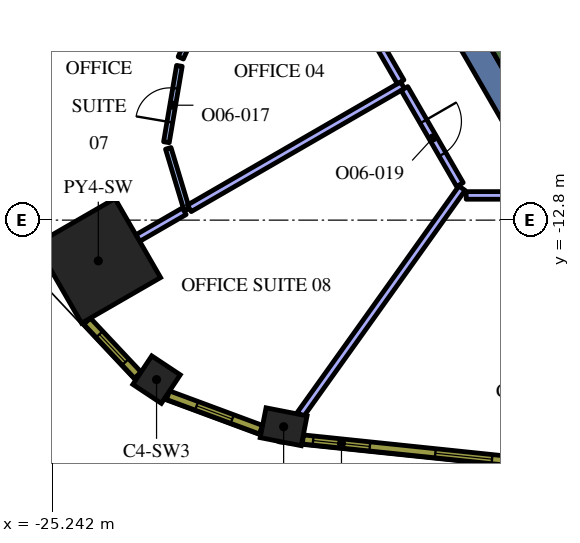
"""IFC4 building model, lengths in metres.
Left out: names, types, materials, properties, quantities, classifications, styles, units other than length and angle.
Written with IfcOpenShell. Run it as: python <this file> out.ifc"""

import sys

from ifc_helpers import new_model, si_unit, direction, frame, frame_2d, origin, origin_2d, place, context, subcontext, project, spatial, rectangle, extrude, element, fill, save


model = new_model("IFC4")
c1 = context("Model", 3, precision=1e-05, world=origin(), true_north=direction((0.0, 1.0)))
c2 = subcontext(c1, "Body", "Model", "MODEL_VIEW")
j1 = project(units=[si_unit("LENGTHUNIT", "METRE"), si_unit("PLANEANGLEUNIT", "RADIAN")], contexts=[c1])
p1 = place(None, origin())
s1 = spatial("IfcSite", under=j1, at=p1, CompositionType="ELEMENT")
p2 = place(p1, origin())
s2 = spatial("IfcBuilding", under=s1, at=p2, CompositionType="ELEMENT")
p3 = place(p2, frame((0.0, 0.0, 210.0)))
s3 = spatial("IfcBuildingStorey", under=s2, at=p3, CompositionType="ELEMENT", Elevation=210.0)
p4 = place(p3, frame((-24.027, -13.872, 0.0), z_axis=(0.0, 0.0, 1.0), x_axis=(-0.866025403784, -0.5, 0.0)))
e1 = element("IfcColumn", 1, at=p4, inside=s3, PredefinedType="COLUMN", context=c2, shape_type="SweptSolid", body=[
    extrude(rectangle(XDim=2.4, YDim=2.4, at=origin_2d()), origin(), (0.0, 0.0, 1.0), 4.2),
])
p5 = place(p3, frame((-19.15, -18.237, 0.0), z_axis=(0.0, 0.0, 1.0), x_axis=(0.981324571854, -0.192359259395, 0.0)))
e2 = element("IfcColumn", 2, at=p5, inside=s3, PredefinedType="COLUMN", context=c2, shape_type="SweptSolid", body=[
    extrude(rectangle(XDim=1.1, YDim=0.8, at=origin_2d()), origin(), (0.0, 0.0, 1.0), 4.2),
])
p6 = place(p3, frame((-22.494, -16.997, 0.0), z_axis=(0.0, 0.0, 1.0), x_axis=(0.833238868178, -0.552913183563, 0.0)))
e3 = element("IfcColumn", 3, at=p6, inside=s3, PredefinedType="COLUMN", context=c2, shape_type="SweptSolid", body=[
    extrude(rectangle(XDim=0.9, YDim=0.9, at=origin_2d()), origin(), (0.0, 0.0, 1.0), 4.2),
])
p7 = place(p3, frame((-14.917, -6.863, 0.0), z_axis=(0.0, 0.0, 1.0), x_axis=(0.499972675833, -0.866041178825, 0.0)))
e4 = element("IfcWall", 4, at=p7, inside=s3, PredefinedType="SOLIDWALL", context=c2, shape_type="SweptSolid", body=[
    extrude(rectangle(XDim=3.829, YDim=0.7, at=frame_2d((1.915, 0.0))), origin(), (0.0, 0.0, 1.0), 4.2),
])
p8 = place(p3, frame((-12.84, -9.511, 0.0), z_axis=(0.0, 0.0, 1.0), x_axis=(-0.500048121057, 0.865997619297, 0.0)))
e5 = element("IfcWall", 5, at=p8, inside=s3, PredefinedType="SOLIDWALL", context=c2, shape_type="SweptSolid", body=[
    extrude(rectangle(XDim=3.634, YDim=0.25, at=frame_2d((1.817, 0.0))), origin(), (0.0, 0.0, 1.0), 4.2),
])
p9 = place(p3, frame((-18.709, -17.916, 0.0), z_axis=(0.0, 0.0, 1.0), x_axis=(0.581023578026, 0.813886725397, 0.0)))
e6 = element("IfcWall", 6, at=p9, inside=s3, PredefinedType="PARTITIONING", context=c2, shape_type="SweptSolid", body=[
    extrude(rectangle(XDim=7.318, YDim=0.2, at=frame_2d((3.659, 0.0))), origin(), (0.0, 0.0, 1.0), 3.45),
])
p10 = place(p3, frame((-14.347, -12.15, 0.0), z_axis=(0.0, 0.0, 1.0), x_axis=(1.0, 0.0, 0.0)))
e7 = element("IfcWall", 7, at=p10, inside=s3, PredefinedType="PARTITIONING", context=c2, shape_type="SweptSolid", body=[
    extrude(rectangle(XDim=1.317, YDim=0.2, at=frame_2d((0.659, 0.0))), origin(), (0.0, 0.0, 1.0), 3.45),
])
p11 = place(p3, frame((-21.157, -6.961, 0.0), z_axis=(0.0, 0.0, 1.0), x_axis=(-0.407627569492, -0.913148270869, 0.0)))
e8 = element("IfcWall", 8, at=p11, inside=s3, PredefinedType="PARTITIONING", context=c2, shape_type="SweptSolid", body=[
    extrude(rectangle(XDim=1.718, YDim=0.15, at=frame_2d((0.859, 0.0))), origin(), (0.0, 0.0, 1.0), 3.45),
])
p12 = place(p3, frame((-22.235, -10.75, 0.0), z_axis=(0.0, 0.0, 1.0), x_axis=(0.167623442148, 0.985851095066, 0.0)))
e9 = element("IfcWall", 9, at=p12, inside=s3, PredefinedType="PARTITIONING", context=c2, shape_type="SweptSolid", body=[
    extrude(rectangle(XDim=2.038, YDim=0.15, at=frame_2d((1.019, 0.0))), origin(), (0.0, 0.0, 1.0), 3.45),
])
p13 = place(p12, frame((0.538, 0.0, 0.0)))
e10 = element("IfcOpeningElement", 10, at=p13, cuts=e9, PredefinedType="OPENING", context=c2, shape_type="SweptSolid", body=[
    extrude(rectangle(XDim=0.9, YDim=2.1, at=frame_2d((0.45, 1.05))), frame((0.0, 0.085, 0.0), z_axis=(0.0, -1.0, 0.0), x_axis=(1.0, 0.0, 0.0)), (0.0, 0.0, 1.0), 0.17),
])
p14 = place(p3, frame((-22.186, -10.911, 0.0), z_axis=(0.0, 0.0, 1.0), x_axis=(0.288899576463, -0.957359407286, 0.0)))
e11 = element("IfcWall", 11, at=p14, inside=s3, PredefinedType="PARTITIONING", context=c2, shape_type="SweptSolid", body=[
    extrude(rectangle(XDim=1.688, YDim=0.15, at=frame_2d((0.844, 0.0))), origin(), (0.0, 0.0, 1.0), 3.45),
])
p15 = place(p3, frame((-21.765, -12.566, 0.0), z_axis=(0.0, 0.0, 1.0), x_axis=(-0.866021473228, -0.500006807861, 0.0)))
e12 = element("IfcWall", 12, at=p15, inside=s3, PredefinedType="PARTITIONING", context=c2, shape_type="SweptSolid", body=[
    extrude(rectangle(XDim=1.412, YDim=0.2, at=frame_2d((0.706, 0.0))), origin(), (0.0, 0.0, 1.0), 3.45),
])
p16 = place(p3, frame((-16.021, -9.25, 0.0), z_axis=(0.0, 0.0, 1.0), x_axis=(-0.86601739438, -0.500013872438, 0.0)))
e13 = element("IfcWall", 13, at=p16, inside=s3, PredefinedType="PARTITIONING", context=c2, shape_type="SweptSolid", body=[
    extrude(rectangle(XDim=6.478, YDim=0.2, at=frame_2d((3.239, 0.0))), origin(), (0.0, 0.0, 1.0), 3.45),
])
p17 = place(p3, frame((-17.681, -6.376, 0.0), z_axis=(0.0, 0.0, 1.0), x_axis=(0.500022299258, -0.866012528919, 0.0)))
e14 = element("IfcWall", 14, at=p17, inside=s3, PredefinedType="PARTITIONING", context=c2, shape_type="SweptSolid", body=[
    extrude(rectangle(XDim=3.219, YDim=0.2, at=frame_2d((1.609, 0.0))), origin(), (0.0, 0.0, 1.0), 3.45),
])
p18 = place(p3, frame((-15.971, -9.337, 0.0), z_axis=(0.0, 0.0, 1.0), x_axis=(0.500007233661, -0.866021227388, 0.0)))
e15 = element("IfcWall", 15, at=p18, inside=s3, PredefinedType="PARTITIONING", context=c2, shape_type="SweptSolid", body=[
    extrude(rectangle(XDim=2.919, YDim=0.2, at=frame_2d((1.459, 0.0))), origin(), (0.0, 0.0, 1.0), 3.45),
])
p19 = place(p18, frame((1.0, 0.0, 0.0)))
e16 = element("IfcOpeningElement", 16, at=p19, cuts=e15, PredefinedType="OPENING", context=c2, shape_type="SweptSolid", body=[
    extrude(rectangle(XDim=1.0, YDim=2.1, at=frame_2d((0.5, 1.05))), frame((0.0, 0.11, 0.0), z_axis=(0.0, -1.0, 0.0), x_axis=(1.0, 0.0, 0.0)), (0.0, 0.0, 1.0), 0.22),
])
p20 = place(p3, frame((-18.644, -18.571, 0.0), z_axis=(0.0, 0.0, 1.0), x_axis=(0.994621961215, -0.103571976272, 0.0)))
e17 = element("IfcWall", 17, at=p20, inside=s3, PredefinedType="SOLIDWALL", context=c2, shape_type="SweptSolid", body=[
    extrude(rectangle(XDim=5.311, YDim=0.24, at=frame_2d((2.655, 0.0))), origin(), (0.0, 0.0, 1.0), 3.95),
])
p21 = place(p20, frame((0.271, 0.0, 0.9)))
e18 = element("IfcOpeningElement", 18, at=p21, cuts=e17, PredefinedType="OPENING", context=c2, shape_type="SweptSolid", body=[
    extrude(rectangle(XDim=1.5, YDim=2.55, at=frame_2d((0.75, 1.275))), frame((0.0, 0.13, 0.0), z_axis=(0.0, -1.0, 0.0), x_axis=(1.0, 0.0, 0.0)), (0.0, 0.0, 1.0), 0.26),
])
p22 = place(p20, frame((3.504, 0.0, 0.9)))
e19 = element("IfcOpeningElement", 19, at=p22, cuts=e17, PredefinedType="OPENING", context=c2, shape_type="SweptSolid", body=[
    extrude(rectangle(XDim=1.5, YDim=2.55, at=frame_2d((0.75, 1.275))), frame((0.0, 0.13, 0.0), z_axis=(0.0, -1.0, 0.0), x_axis=(1.0, 0.0, 0.0)), (0.0, 0.0, 1.0), 0.26),
])
p23 = place(p3, frame((-24.323, -15.459, 0.0), z_axis=(0.0, 0.0, 1.0), x_axis=(0.684770274166, -0.728758994194, 0.0)))
e20 = element("IfcWall", 20, at=p23, inside=s3, PredefinedType="SOLIDWALL", context=c2, shape_type="SweptSolid", body=[
    extrude(rectangle(XDim=1.948, YDim=0.24, at=frame_2d((0.974, 0.0))), origin(), (0.0, 0.0, 1.0), 3.95),
])
p24 = place(p23, frame((0.474, 0.0, 0.9)))
e21 = element("IfcOpeningElement", 21, at=p24, cuts=e20, PredefinedType="OPENING", context=c2, shape_type="SweptSolid", body=[
    extrude(rectangle(XDim=1.0, YDim=2.55, at=frame_2d((0.5, 1.275))), frame((0.0, 0.13, 0.0), z_axis=(0.0, -1.0, 0.0), x_axis=(1.0, 0.0, 0.0)), (0.0, 0.0, 1.0), 0.26),
])
p25 = place(p3, frame((-22.194, -17.406, 0.0), z_axis=(0.0, 0.0, 1.0), x_axis=(0.937569171184, -0.347798863203, 0.0)))
e22 = element("IfcWall", 22, at=p25, inside=s3, PredefinedType="SOLIDWALL", context=c2, shape_type="SweptSolid", body=[
    extrude(rectangle(XDim=2.609, YDim=0.24, at=frame_2d((1.305, 0.0))), origin(), (0.0, 0.0, 1.0), 3.95),
])
p26 = place(p25, frame((0.805, 0.0, 0.9)))
e23 = element("IfcOpeningElement", 23, at=p26, cuts=e22, PredefinedType="OPENING", context=c2, shape_type="SweptSolid", body=[
    extrude(rectangle(XDim=1.0, YDim=2.55, at=frame_2d((0.5, 1.275))), frame((0.0, 0.13, 0.0), z_axis=(0.0, -1.0, 0.0), x_axis=(1.0, 0.0, 0.0)), (0.0, 0.0, 1.0), 0.26),
])
p27 = place(p13, origin())
e24 = element("IfcDoor", 24, at=p27, inside=s3, OperationType="SINGLE_SWING_LEFT", PredefinedType="DOOR", context=c2, shape_type="SweptSolid", body=[
    extrude(rectangle(XDim=0.9, YDim=2.1, at=frame_2d((0.45, 1.05))), frame((0.0, 0.025, 0.0), z_axis=(0.0, -1.0, 0.0), x_axis=(1.0, 0.0, 0.0)), (0.0, 0.0, 1.0), 0.05),
])
fill(e10, e24)
p28 = place(p19, origin())
e25 = element("IfcDoor", 25, at=p28, inside=s3, OperationType="SINGLE_SWING_RIGHT", PredefinedType="DOOR", context=c2, shape_type="SweptSolid", body=[
    extrude(rectangle(XDim=1.0, YDim=2.1, at=frame_2d((0.5, 1.05))), frame((0.0, 0.025, 0.0), z_axis=(0.0, -1.0, 0.0), x_axis=(1.0, 0.0, 0.0)), (0.0, 0.0, 1.0), 0.05),
])
fill(e16, e25)
p29 = place(p21, origin())
e26 = element("IfcWindow", 26, at=p29, inside=s3, PartitioningType="SINGLE_PANEL", PredefinedType="WINDOW", context=c2, shape_type="SweptSolid", body=[
    extrude(rectangle(XDim=1.5, YDim=2.55, at=frame_2d((0.75, 1.275))), frame((0.0, 0.04, 0.0), z_axis=(0.0, -1.0, 0.0), x_axis=(1.0, 0.0, 0.0)), (0.0, 0.0, 1.0), 0.06),
])
fill(e18, e26)
p30 = place(p22, origin())
e27 = element("IfcWindow", 27, at=p30, inside=s3, PartitioningType="SINGLE_PANEL", PredefinedType="WINDOW", context=c2, shape_type="SweptSolid", body=[
    extrude(rectangle(XDim=1.5, YDim=2.55, at=frame_2d((0.75, 1.275))), frame((0.0, 0.04, 0.0), z_axis=(0.0, -1.0, 0.0), x_axis=(1.0, 0.0, 0.0)), (0.0, 0.0, 1.0), 0.06),
])
fill(e19, e27)
p31 = place(p24, origin())
e28 = element("IfcWindow", 28, at=p31, inside=s3, PartitioningType="SINGLE_PANEL", PredefinedType="WINDOW", context=c2, shape_type="SweptSolid", body=[
    extrude(rectangle(XDim=1.0, YDim=2.55, at=frame_2d((0.5, 1.275))), frame((0.0, 0.04, 0.0), z_axis=(0.0, -1.0, 0.0), x_axis=(1.0, 0.0, 0.0)), (0.0, 0.0, 1.0), 0.06),
])
fill(e21, e28)
p32 = place(p26, origin())
e29 = element("IfcWindow", 29, at=p32, inside=s3, PartitioningType="SINGLE_PANEL", PredefinedType="WINDOW", context=c2, shape_type="SweptSolid", body=[
    extrude(rectangle(XDim=1.0, YDim=2.55, at=frame_2d((0.5, 1.275))), frame((0.0, 0.04, 0.0), z_axis=(0.0, -1.0, 0.0), x_axis=(1.0, 0.0, 0.0)), (0.0, 0.0, 1.0), 0.06),
])
fill(e23, e29)
save(model, sys.argv[1])
